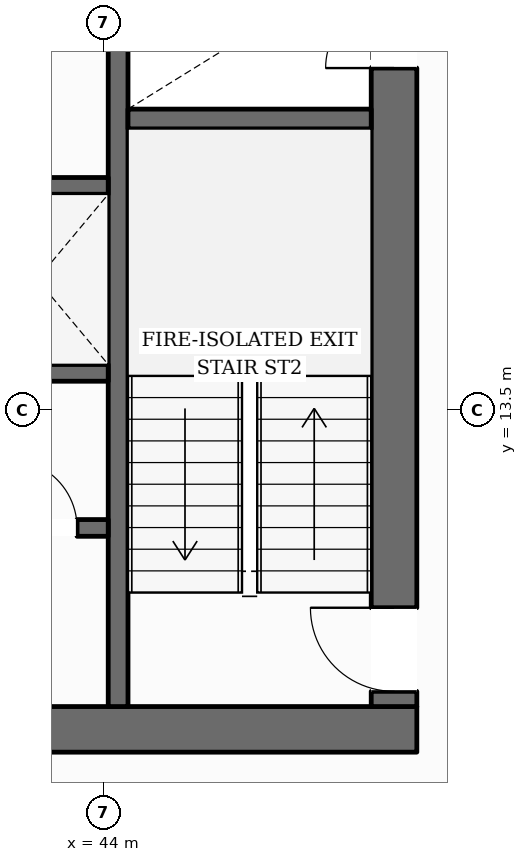
"""IFC4 building model, lengths in metres.
Left out: names, types, materials, properties, quantities, classifications, styles, units other than length and angle.
Written with IfcOpenShell. Run it as: python <this file> out.ifc"""

import sys

from ifc_helpers import new_model, si_unit, direction, frame, frame_2d, origin, place, context, subcontext, project, spatial, rectangle, extrude, element, fill, save


model = new_model("IFC4")
c1 = context("Model", 3, precision=1e-05, world=origin(), true_north=direction((0.0, 1.0)))
c2 = subcontext(c1, "Body", "Model", "MODEL_VIEW")
j1 = project(units=[si_unit("LENGTHUNIT", "METRE"), si_unit("PLANEANGLEUNIT", "RADIAN")], contexts=[c1])
p1 = place(None, origin())
s1 = spatial("IfcSite", under=j1, at=p1, CompositionType="ELEMENT")
p2 = place(p1, origin())
s2 = spatial("IfcBuilding", under=s1, at=p2, CompositionType="ELEMENT")
p3 = place(p2, frame((0.0, 0.0, 29.1)))
s3 = spatial("IfcBuildingStorey", under=s2, at=p3, CompositionType="ELEMENT", Elevation=29.1)
p4 = place(p3, frame((27.88, 9.3, 0.0), z_axis=(0.0, 0.0, 1.0), x_axis=(1.0, 0.0, 0.0)))
e1 = element("IfcWall", 1, at=p4, inside=s3, PredefinedType="SOLIDWALL", context=c2, shape_type="SweptSolid", body=[
    extrude(rectangle(XDim=20.24, YDim=0.6, at=frame_2d((10.12, 0.0))), origin(), (0.0, 0.0, 1.0), 3.59),
])
p5 = place(p4, frame((10.62, 0.0, 0.0)))
e2 = element("IfcOpeningElement", 2, at=p5, cuts=e1, PredefinedType="OPENING", context=c2, shape_type="SweptSolid", body=[
    extrude(rectangle(XDim=1.4, YDim=2.2, at=frame_2d((0.7, 1.1))), frame((0.0, 0.31, 0.0), z_axis=(0.0, -1.0, 0.0), x_axis=(1.0, 0.0, 0.0)), (0.0, 0.0, 1.0), 0.62),
])
p6 = place(p3, frame((47.82, 9.6, 0.0), z_axis=(0.0, 0.0, 1.0), x_axis=(0.0, 1.0, 0.0)))
e3 = element("IfcWall", 3, at=p6, inside=s3, PredefinedType="SOLIDWALL", context=c2, shape_type="SweptSolid", body=[
    extrude(rectangle(XDim=13.0, YDim=0.6, at=frame_2d((6.5, 0.0))), origin(), (0.0, 0.0, 1.0), 3.59),
])
p7 = place(p6, frame((0.2, 0.0, 0.0)))
e4 = element("IfcOpeningElement", 4, at=p7, cuts=e3, PredefinedType="OPENING", context=c2, shape_type="SweptSolid", body=[
    extrude(rectangle(XDim=1.1, YDim=2.15, at=frame_2d((0.55, 1.075))), frame((0.0, 0.31, 0.0), z_axis=(0.0, -1.0, 0.0), x_axis=(1.0, 0.0, 0.0)), (0.0, 0.0, 1.0), 0.62),
])
p8 = place(p6, frame((8.4, 0.0, 0.0)))
e5 = element("IfcOpeningElement", 5, at=p8, cuts=e3, PredefinedType="OPENING", context=c2, shape_type="SweptSolid", body=[
    extrude(rectangle(XDim=0.9, YDim=2.1, at=frame_2d((0.45, 1.05))), frame((0.0, 0.31, 0.0), z_axis=(0.0, -1.0, 0.0), x_axis=(1.0, 0.0, 0.0)), (0.0, 0.0, 1.0), 0.62),
])
p9 = place(p3, frame((44.19, 9.6, 0.0), z_axis=(0.0, 0.0, 1.0), x_axis=(0.0, 1.0, 0.0)))
e6 = element("IfcWall", 6, at=p9, inside=s3, PredefinedType="SHEAR", context=c2, shape_type="SweptSolid", body=[
    extrude(rectangle(XDim=13.0, YDim=0.26, at=frame_2d((6.5, 0.0))), origin(), (0.0, 0.0, 1.0), 3.59),
])
p10 = place(p9, frame((10.925, 0.0, 0.0)))
e7 = element("IfcOpeningElement", 7, at=p10, cuts=e6, PredefinedType="OPENING", context=c2, shape_type="SweptSolid", body=[
    extrude(rectangle(XDim=1.25, YDim=2.25, at=frame_2d((0.625, 1.125))), frame((0.0, 0.14, 0.0), z_axis=(0.0, -1.0, 0.0), x_axis=(1.0, 0.0, 0.0)), (0.0, 0.0, 1.0), 0.28),
])
p11 = place(p3, frame((44.32, 17.33, 0.0), z_axis=(0.0, 0.0, 1.0), x_axis=(1.0, 0.0, 0.0)))
e8 = element("IfcWall", 8, at=p11, inside=s3, PredefinedType="SHEAR", context=c2, shape_type="SweptSolid", body=[
    extrude(rectangle(XDim=3.2, YDim=0.26, at=frame_2d((1.6, 0.0))), origin(), (0.0, 0.0, 1.0), 3.59),
])
p12 = place(p3, frame((31.94, 16.45, 0.0), z_axis=(0.0, 0.0, 1.0), x_axis=(1.0, 0.0, 0.0)))
e9 = element("IfcWall", 9, at=p12, inside=s3, PredefinedType="SOLIDWALL", context=c2, shape_type="SweptSolid", body=[
    extrude(rectangle(XDim=12.12, YDim=0.22, at=frame_2d((6.06, 0.0))), origin(), (0.0, 0.0, 1.0), 3.59),
])
p13 = place(p3, frame((31.94, 13.99, 0.0), z_axis=(0.0, 0.0, 1.0), x_axis=(1.0, 0.0, 0.0)))
e10 = element("IfcWall", 10, at=p13, inside=s3, PredefinedType="SOLIDWALL", context=c2, shape_type="SweptSolid", body=[
    extrude(rectangle(XDim=12.12, YDim=0.22, at=frame_2d((6.06, 0.0))), origin(), (0.0, 0.0, 1.0), 3.59),
])
p14 = place(p13, frame((0.385, 0.0, 0.0)))
e11 = element("IfcOpeningElement", 11, at=p14, cuts=e10, PredefinedType="OPENING", context=c2, shape_type="SweptSolid", body=[
    extrude(rectangle(XDim=1.1, YDim=2.2, at=frame_2d((0.55, 1.1))), frame((0.0, 0.12, 0.0), z_axis=(0.0, -1.0, 0.0), x_axis=(1.0, 0.0, 0.0)), (0.0, 0.0, 1.0), 0.24),
])
p15 = place(p13, frame((2.435, 0.0, 0.0)))
e12 = element("IfcOpeningElement", 12, at=p15, cuts=e10, PredefinedType="OPENING", context=c2, shape_type="SweptSolid", body=[
    extrude(rectangle(XDim=1.1, YDim=2.2, at=frame_2d((0.55, 1.1))), frame((0.0, 0.12, 0.0), z_axis=(0.0, -1.0, 0.0), x_axis=(1.0, 0.0, 0.0)), (0.0, 0.0, 1.0), 0.24),
])
p16 = place(p13, frame((4.485, 0.0, 0.0)))
e13 = element("IfcOpeningElement", 13, at=p16, cuts=e10, PredefinedType="OPENING", context=c2, shape_type="SweptSolid", body=[
    extrude(rectangle(XDim=1.1, YDim=2.2, at=frame_2d((0.55, 1.1))), frame((0.0, 0.12, 0.0), z_axis=(0.0, -1.0, 0.0), x_axis=(1.0, 0.0, 0.0)), (0.0, 0.0, 1.0), 0.24),
])
p17 = place(p3, frame((40.28, 11.95, 0.0), z_axis=(0.0, 0.0, 1.0), x_axis=(1.0, 0.0, 0.0)))
e14 = element("IfcWall", 14, at=p17, inside=s3, PredefinedType="SOLIDWALL", context=c2, shape_type="SweptSolid", body=[
    extrude(rectangle(XDim=3.78, YDim=0.22, at=frame_2d((1.89, 0.0))), origin(), (0.0, 0.0, 1.0), 3.59),
])
p18 = place(p17, frame((0.62, 0.0, 0.0)))
e15 = element("IfcOpeningElement", 15, at=p18, cuts=e14, PredefinedType="OPENING", context=c2, shape_type="SweptSolid", body=[
    extrude(rectangle(XDim=0.9, YDim=2.1, at=frame_2d((0.45, 1.05))), frame((0.0, 0.12, 0.0), z_axis=(0.0, -1.0, 0.0), x_axis=(1.0, 0.0, 0.0)), (0.0, 0.0, 1.0), 0.24),
])
p19 = place(p17, frame((2.47, 0.0, 0.0)))
e16 = element("IfcOpeningElement", 16, at=p19, cuts=e14, PredefinedType="OPENING", context=c2, shape_type="SweptSolid", body=[
    extrude(rectangle(XDim=0.9, YDim=2.1, at=frame_2d((0.45, 1.05))), frame((0.0, 0.12, 0.0), z_axis=(0.0, -1.0, 0.0), x_axis=(1.0, 0.0, 0.0)), (0.0, 0.0, 1.0), 0.24),
])
p20 = place(p3, frame((45.837, 44.537, 0.0), z_axis=(0.0, 0.0, 1.0), x_axis=(0.495711630902, -0.868487178367, 0.0)))
e17 = element("IfcWall", 17, at=p20, inside=s3, PredefinedType="STANDARD", context=c2, shape_type="SweptSolid", body=[
    extrude(rectangle(XDim=34.092, YDim=0.38, at=frame_2d((17.046, 0.0))), origin(), (0.0, 0.0, 1.0), 2.97),
])
p21 = place(p20, frame((30.031, 0.0, 0.65)))
e18 = element("IfcOpeningElement", 18, at=p21, cuts=e17, PredefinedType="OPENING", context=c2, shape_type="SweptSolid", body=[
    extrude(rectangle(XDim=1.65, YDim=1.75, at=frame_2d((0.825, 0.875))), frame((0.0, 0.2, 0.0), z_axis=(0.0, -1.0, 0.0), x_axis=(1.0, 0.0, 0.0)), (0.0, 0.0, 1.0), 0.4),
])
p22 = place(p20, frame((24.508, 0.0, 0.65)))
e19 = element("IfcOpeningElement", 19, at=p22, cuts=e17, PredefinedType="OPENING", context=c2, shape_type="SweptSolid", body=[
    extrude(rectangle(XDim=1.65, YDim=1.75, at=frame_2d((0.825, 0.875))), frame((0.0, 0.2, 0.0), z_axis=(0.0, -1.0, 0.0), x_axis=(1.0, 0.0, 0.0)), (0.0, 0.0, 1.0), 0.4),
])
p23 = place(p20, frame((13.462, 0.0, 0.65)))
e20 = element("IfcOpeningElement", 20, at=p23, cuts=e17, PredefinedType="OPENING", context=c2, shape_type="SweptSolid", body=[
    extrude(rectangle(XDim=1.65, YDim=1.75, at=frame_2d((0.825, 0.875))), frame((0.0, 0.2, 0.0), z_axis=(0.0, -1.0, 0.0), x_axis=(1.0, 0.0, 0.0)), (0.0, 0.0, 1.0), 0.4),
])
p24 = place(p20, frame((7.939, 0.0, 0.65)))
e21 = element("IfcOpeningElement", 21, at=p24, cuts=e17, PredefinedType="OPENING", context=c2, shape_type="SweptSolid", body=[
    extrude(rectangle(XDim=1.65, YDim=1.75, at=frame_2d((0.825, 0.875))), frame((0.0, 0.2, 0.0), z_axis=(0.0, -1.0, 0.0), x_axis=(1.0, 0.0, 0.0)), (0.0, 0.0, 1.0), 0.4),
])
p25 = place(p20, frame((2.415, 0.0, 0.65)))
e22 = element("IfcOpeningElement", 22, at=p25, cuts=e17, PredefinedType="OPENING", context=c2, shape_type="SweptSolid", body=[
    extrude(rectangle(XDim=1.65, YDim=1.75, at=frame_2d((0.825, 0.875))), frame((0.0, 0.2, 0.0), z_axis=(0.0, -1.0, 0.0), x_axis=(1.0, 0.0, 0.0)), (0.0, 0.0, 1.0), 0.4),
])
p26 = place(p7, origin())
e23 = element("IfcDoor", 23, at=p26, inside=s3, OperationType="SINGLE_SWING_RIGHT", PredefinedType="DOOR", context=c2, shape_type="SweptSolid", body=[
    extrude(rectangle(XDim=1.1, YDim=2.15, at=frame_2d((0.55, 1.075))), frame((0.0, 0.025, 0.0), z_axis=(0.0, -1.0, 0.0), x_axis=(1.0, 0.0, 0.0)), (0.0, 0.0, 1.0), 0.05),
])
fill(e4, e23)
p27 = place(p8, origin())
e24 = element("IfcDoor", 24, at=p27, inside=s3, OperationType="SINGLE_SWING_LEFT", PredefinedType="DOOR", context=c2, shape_type="SweptSolid", body=[
    extrude(rectangle(XDim=0.9, YDim=2.1, at=frame_2d((0.45, 1.05))), frame((0.0, 0.025, 0.0), z_axis=(0.0, -1.0, 0.0), x_axis=(1.0, 0.0, 0.0)), (0.0, 0.0, 1.0), 0.05),
])
fill(e5, e24)
p28 = place(p19, origin())
e25 = element("IfcDoor", 25, at=p28, inside=s3, OperationType="SINGLE_SWING_LEFT", PredefinedType="DOOR", context=c2, shape_type="SweptSolid", body=[
    extrude(rectangle(XDim=0.9, YDim=2.1, at=frame_2d((0.45, 1.05))), frame((0.0, 0.025, 0.0), z_axis=(0.0, -1.0, 0.0), x_axis=(1.0, 0.0, 0.0)), (0.0, 0.0, 1.0), 0.05),
])
fill(e16, e25)
save(model, sys.argv[1])
